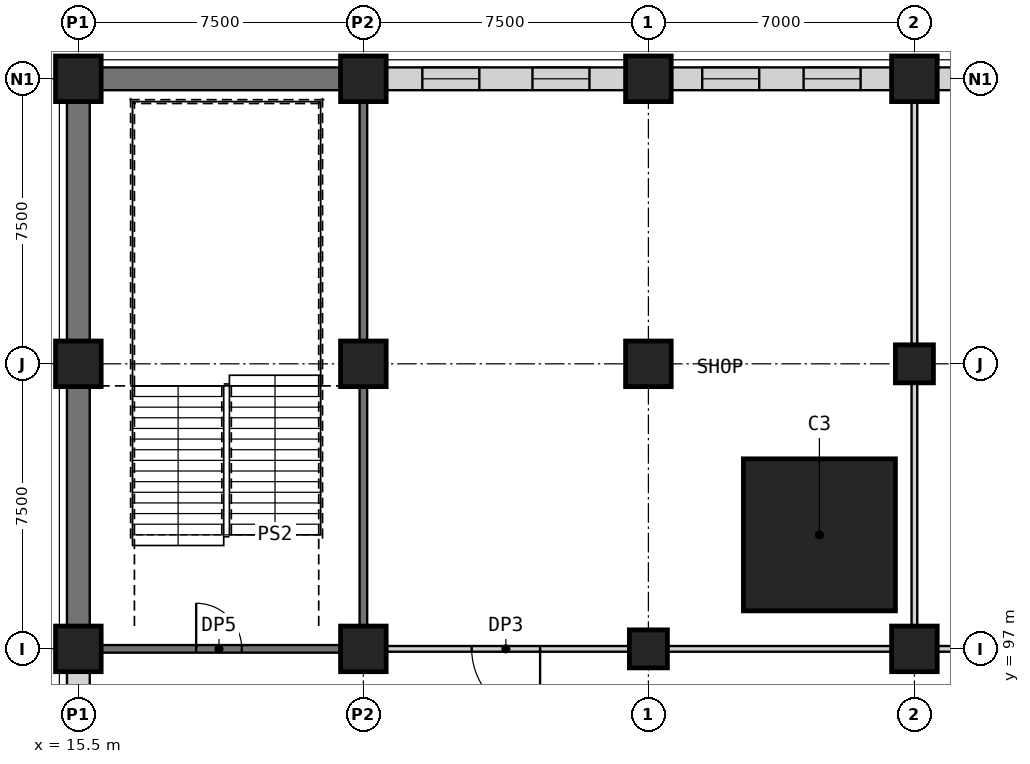
"""IFC4 building model, lengths in metres.
Left out: names, types, materials, properties, quantities, classifications, styles, units other than length and angle.
Written with IfcOpenShell. Run it as: python <this file> out.ifc"""

import sys

from ifc_helpers import new_model, si_unit, direction, frame, frame_2d, origin, origin_2d, place, context, subcontext, project, spatial, rectangle, extrude, element, fill, save


model = new_model("IFC4")
c1 = context("Model", 3, precision=1e-05, world=origin(), true_north=direction((0.0, 1.0)))
c2 = subcontext(c1, "Body", "Model", "MODEL_VIEW")
j1 = project(units=[si_unit("LENGTHUNIT", "METRE"), si_unit("PLANEANGLEUNIT", "RADIAN")], contexts=[c1])
p1 = place(None, origin())
s1 = spatial("IfcSite", under=j1, at=p1, CompositionType="ELEMENT")
p2 = place(p1, origin())
s2 = spatial("IfcBuilding", under=s1, at=p2, CompositionType="ELEMENT")
p3 = place(p2, frame((0.0, 0.0, 13.5)))
s3 = spatial("IfcBuildingStorey", under=s2, at=p3, CompositionType="ELEMENT", Elevation=13.5)
p4 = place(p3, frame((30.5, 97.0, 0.0), z_axis=(0.0, 0.0, 1.0), x_axis=(1.0, 0.0, 0.0)))
e1 = element("IfcColumn", 1, at=p4, inside=s3, PredefinedType="COLUMN", context=c2, shape_type="SweptSolid", body=[
    extrude(rectangle(XDim=1.0, YDim=1.0, at=origin_2d()), origin(), (0.0, 0.0, 1.0), 5.0),
])
p5 = place(p3, frame((37.5, 97.0, 0.0), z_axis=(0.0, 0.0, 1.0), x_axis=(1.0, 0.0, 0.0)))
e2 = element("IfcColumn", 2, at=p5, inside=s3, PredefinedType="COLUMN", context=c2, shape_type="SweptSolid", body=[
    extrude(rectangle(XDim=1.2, YDim=1.2, at=origin_2d()), origin(), (0.0, 0.0, 1.0), 5.0),
])
p6 = place(p3, frame((37.5, 104.5, 0.0), z_axis=(0.0, 0.0, 1.0), x_axis=(1.0, 0.0, 0.0)))
e3 = element("IfcColumn", 3, at=p6, inside=s3, PredefinedType="COLUMN", context=c2, shape_type="SweptSolid", body=[
    extrude(rectangle(XDim=1.0, YDim=1.0, at=origin_2d()), origin(), (0.0, 0.0, 1.0), 5.0),
])
p7 = place(p3, frame((35.0, 100.0, 0.0), z_axis=(0.0, 0.0, 1.0), x_axis=(1.0, 0.0, 0.0)))
e4 = element("IfcColumn", 4, at=p7, inside=s3, PredefinedType="COLUMN", context=c2, shape_type="SweptSolid", body=[
    extrude(rectangle(XDim=4.0, YDim=4.0, at=origin_2d()), origin(), (0.0, 0.0, 1.0), 5.0),
])
for number, where, z_axis, x_axis in (
    (5, (15.5, 97.0, 0.0), (0.0, 0.0, 1.0), (1.0, 0.0, 0.0)),
    (6, (15.5, 104.5, 0.0), (0.0, 0.0, 1.0), (1.0, 0.0, 0.0)),
    (7, (15.5, 112.0, 0.0), (0.0, 0.0, 1.0), (1.0, 0.0, 0.0)),
    (8, (23.0, 97.0, 0.0), (0.0, 0.0, 1.0), (1.0, 0.0, 0.0)),
    (9, (23.0, 104.5, 0.0), (0.0, 0.0, 1.0), (1.0, 0.0, 0.0)),
    (10, (23.0, 112.0, 0.0), (0.0, 0.0, 1.0), (1.0, 0.0, 0.0)),
    (11, (30.5, 104.5, 0.0), (0.0, 0.0, 1.0), (1.0, 0.0, 0.0)),
    (12, (30.5, 112.0, 0.0), (0.0, 0.0, 1.0), (1.0, 0.0, 0.0)),
    (13, (37.5, 112.0, 0.0), (0.0, 0.0, 1.0), (1.0, 0.0, 0.0)),
):
    element("IfcColumn", number, at=place(p3, frame(where, z_axis=z_axis, x_axis=x_axis)), inside=s3, PredefinedType="COLUMN", context=c2, shape_type="SweptSolid", body=[
        extrude(rectangle(XDim=1.2, YDim=1.2, at=origin_2d()), origin(), (0.0, 0.0, 1.0), 5.0),
    ])
p8 = place(p3, frame((16.1, 97.0, 0.0), z_axis=(0.0, 0.0, 1.0), x_axis=(1.0, 0.0, 0.0)))
e14 = element("IfcWall", 14, at=p8, inside=s3, PredefinedType="SHEAR", context=c2, shape_type="SweptSolid", body=[
    extrude(rectangle(XDim=6.3, YDim=0.2, at=frame_2d((3.15, 0.0))), origin(), (0.0, 0.0, 1.0), 4.7),
])
p9 = place(p8, frame((2.5, 0.0, 0.0)))
e15 = element("IfcOpeningElement", 15, at=p9, cuts=e14, PredefinedType="OPENING", context=c2, shape_type="SweptSolid", body=[
    extrude(rectangle(XDim=1.2, YDim=2.1, at=frame_2d((0.6, 1.05))), frame((0.0, 0.11, 0.0), z_axis=(0.0, -1.0, 0.0), x_axis=(1.0, 0.0, 0.0)), (0.0, 0.0, 1.0), 0.22),
])
p10 = place(p3, frame((30.0, 97.0, 0.0), z_axis=(0.0, 0.0, 1.0), x_axis=(-1.0, 0.0, 0.0)))
e16 = element("IfcWall", 16, at=p10, inside=s3, PredefinedType="PARTITIONING", context=c2, shape_type="SweptSolid", body=[
    extrude(rectangle(XDim=6.4, YDim=0.15, at=frame_2d((3.2, 0.0))), origin(), (0.0, 0.0, 1.0), 4.7),
])
p11 = place(p10, frame((2.35, 0.0, 0.0)))
e17 = element("IfcOpeningElement", 17, at=p11, cuts=e16, PredefinedType="OPENING", context=c2, shape_type="SweptSolid", body=[
    extrude(rectangle(XDim=1.8, YDim=2.4, at=frame_2d((0.9, 1.2))), frame((0.0, 0.085, 0.0), z_axis=(0.0, -1.0, 0.0), x_axis=(1.0, 0.0, 0.0)), (0.0, 0.0, 1.0), 0.17),
])
p12 = place(p3, frame((31.0, 97.0, 0.0), z_axis=(0.0, 0.0, 1.0), x_axis=(1.0, 0.0, 0.0)))
e18 = element("IfcWall", 18, at=p12, inside=s3, PredefinedType="PARTITIONING", context=c2, shape_type="SweptSolid", body=[
    extrude(rectangle(XDim=5.9, YDim=0.15, at=frame_2d((2.95, 0.0))), origin(), (0.0, 0.0, 1.0), 4.7),
])
p13 = place(p3, frame((44.4, 97.0, 0.0), z_axis=(0.0, 0.0, 1.0), x_axis=(-1.0, 0.0, 0.0)))
e19 = element("IfcWall", 19, at=p13, inside=s3, PredefinedType="PARTITIONING", context=c2, shape_type="SweptSolid", body=[
    extrude(rectangle(XDim=6.3, YDim=0.15, at=frame_2d((3.15, 0.0))), origin(), (0.0, 0.0, 1.0), 4.7),
])
p14 = place(p13, frame((2.25, 0.0, 0.0)))
e20 = element("IfcOpeningElement", 20, at=p14, cuts=e19, PredefinedType="OPENING", context=c2, shape_type="SweptSolid", body=[
    extrude(rectangle(XDim=1.8, YDim=2.4, at=frame_2d((0.9, 1.2))), frame((0.0, 0.085, 0.0), z_axis=(0.0, -1.0, 0.0), x_axis=(1.0, 0.0, 0.0)), (0.0, 0.0, 1.0), 0.17),
])
p15 = place(p3, frame((16.1, 112.0, 0.0), z_axis=(0.0, 0.0, 1.0), x_axis=(1.0, 0.0, 0.0)))
e21 = element("IfcWall", 21, at=p15, inside=s3, PredefinedType="PARTITIONING", context=c2, shape_type="SweptSolid", body=[
    extrude(rectangle(XDim=6.3, YDim=0.6, at=frame_2d((3.15, 0.0))), origin(), (0.0, 0.0, 1.0), 4.1),
])
p16 = place(p3, frame((23.6, 112.0, 0.0), z_axis=(0.0, 0.0, 1.0), x_axis=(1.0, 0.0, 0.0)))
e22 = element("IfcWall", 22, at=p16, inside=s3, PredefinedType="PARTITIONING", context=c2, shape_type="SweptSolid", body=[
    extrude(rectangle(XDim=6.3, YDim=0.6, at=frame_2d((3.15, 0.0))), origin(), (0.0, 0.0, 1.0), 4.1),
])
p17 = place(p16, frame((0.951, 0.0, 0.9)))
e23 = element("IfcOpeningElement", 23, at=p17, cuts=e22, PredefinedType="OPENING", context=c2, shape_type="SweptSolid", body=[
    extrude(rectangle(XDim=1.5, YDim=2.8, at=frame_2d((0.75, 1.4))), frame((0.0, 0.31, 0.0), z_axis=(0.0, -1.0, 0.0), x_axis=(1.0, 0.0, 0.0)), (0.0, 0.0, 1.0), 0.62),
])
p18 = place(p16, frame((3.849, 0.0, 0.9)))
e24 = element("IfcOpeningElement", 24, at=p18, cuts=e22, PredefinedType="OPENING", context=c2, shape_type="SweptSolid", body=[
    extrude(rectangle(XDim=1.5, YDim=2.8, at=frame_2d((0.75, 1.4))), frame((0.0, 0.31, 0.0), z_axis=(0.0, -1.0, 0.0), x_axis=(1.0, 0.0, 0.0)), (0.0, 0.0, 1.0), 0.62),
])
p19 = place(p3, frame((31.1, 112.0, 0.0), z_axis=(0.0, 0.0, 1.0), x_axis=(1.0, 0.0, 0.0)))
e25 = element("IfcWall", 25, at=p19, inside=s3, PredefinedType="PARTITIONING", context=c2, shape_type="SweptSolid", body=[
    extrude(rectangle(XDim=5.8, YDim=0.6, at=frame_2d((2.9, 0.0))), origin(), (0.0, 0.0, 1.0), 4.1),
])
p20 = place(p19, frame((0.816, 0.0, 0.9)))
e26 = element("IfcOpeningElement", 26, at=p20, cuts=e25, PredefinedType="OPENING", context=c2, shape_type="SweptSolid", body=[
    extrude(rectangle(XDim=1.5, YDim=2.8, at=frame_2d((0.75, 1.4))), frame((0.0, 0.31, 0.0), z_axis=(0.0, -1.0, 0.0), x_axis=(1.0, 0.0, 0.0)), (0.0, 0.0, 1.0), 0.62),
])
p21 = place(p19, frame((3.484, 0.0, 0.9)))
e27 = element("IfcOpeningElement", 27, at=p21, cuts=e25, PredefinedType="OPENING", context=c2, shape_type="SweptSolid", body=[
    extrude(rectangle(XDim=1.5, YDim=2.8, at=frame_2d((0.75, 1.4))), frame((0.0, 0.31, 0.0), z_axis=(0.0, -1.0, 0.0), x_axis=(1.0, 0.0, 0.0)), (0.0, 0.0, 1.0), 0.62),
])
p22 = place(p3, frame((38.1, 112.0, 0.0), z_axis=(0.0, 0.0, 1.0), x_axis=(1.0, 0.0, 0.0)))
e28 = element("IfcWall", 28, at=p22, inside=s3, PredefinedType="PARTITIONING", context=c2, shape_type="SweptSolid", body=[
    extrude(rectangle(XDim=6.3, YDim=0.6, at=frame_2d((3.15, 0.0))), origin(), (0.0, 0.0, 1.0), 4.1),
])
p23 = place(p22, frame((0.951, 0.0, 0.9)))
e29 = element("IfcOpeningElement", 29, at=p23, cuts=e28, PredefinedType="OPENING", context=c2, shape_type="SweptSolid", body=[
    extrude(rectangle(XDim=1.5, YDim=2.8, at=frame_2d((0.75, 1.4))), frame((0.0, 0.31, 0.0), z_axis=(0.0, -1.0, 0.0), x_axis=(1.0, 0.0, 0.0)), (0.0, 0.0, 1.0), 0.62),
])
p24 = place(p22, frame((3.849, 0.0, 0.9)))
e30 = element("IfcOpeningElement", 30, at=p24, cuts=e28, PredefinedType="OPENING", context=c2, shape_type="SweptSolid", body=[
    extrude(rectangle(XDim=1.5, YDim=2.8, at=frame_2d((0.75, 1.4))), frame((0.0, 0.31, 0.0), z_axis=(0.0, -1.0, 0.0), x_axis=(1.0, 0.0, 0.0)), (0.0, 0.0, 1.0), 0.62),
])
p25 = place(p3, frame((15.5, 90.6, 0.0), z_axis=(0.0, 0.0, 1.0), x_axis=(0.0, 1.0, 0.0)))
e31 = element("IfcWall", 31, at=p25, inside=s3, PredefinedType="PARTITIONING", context=c2, shape_type="SweptSolid", body=[
    extrude(rectangle(XDim=5.8, YDim=0.6, at=frame_2d((2.9, 0.0))), origin(), (0.0, 0.0, 1.0), 4.1),
])
p26 = place(p25, frame((0.816, 0.0, 0.9)))
e32 = element("IfcOpeningElement", 32, at=p26, cuts=e31, PredefinedType="OPENING", context=c2, shape_type="SweptSolid", body=[
    extrude(rectangle(XDim=1.5, YDim=2.8, at=frame_2d((0.75, 1.4))), frame((0.0, 0.31, 0.0), z_axis=(0.0, -1.0, 0.0), x_axis=(1.0, 0.0, 0.0)), (0.0, 0.0, 1.0), 0.62),
])
p27 = place(p25, frame((3.484, 0.0, 0.9)))
e33 = element("IfcOpeningElement", 33, at=p27, cuts=e31, PredefinedType="OPENING", context=c2, shape_type="SweptSolid", body=[
    extrude(rectangle(XDim=1.5, YDim=2.8, at=frame_2d((0.75, 1.4))), frame((0.0, 0.31, 0.0), z_axis=(0.0, -1.0, 0.0), x_axis=(1.0, 0.0, 0.0)), (0.0, 0.0, 1.0), 0.62),
])
for number, where, z_axis, x_axis in (
    (34, (15.5, 97.6, 0.0), (0.0, 0.0, 1.0), (0.0, 1.0, 0.0)),
    (35, (15.5, 105.1, 0.0), (0.0, 0.0, 1.0), (0.0, 1.0, 0.0)),
):
    element("IfcWall", number, at=place(p3, frame(where, z_axis=z_axis, x_axis=x_axis)), inside=s3, PredefinedType="PARTITIONING", context=c2, shape_type="SweptSolid", body=[
        extrude(rectangle(XDim=6.3, YDim=0.6, at=frame_2d((3.15, 0.0))), origin(), (0.0, 0.0, 1.0), 4.1),
    ])
for number, where, z_axis, x_axis in (
    (36, (23.0, 97.6, 0.0), (0.0, 0.0, 1.0), (0.0, 1.0, 0.0)),
    (37, (23.0, 105.1, 0.0), (0.0, 0.0, 1.0), (0.0, 1.0, 0.0)),
):
    element("IfcWall", number, at=place(p3, frame(where, z_axis=z_axis, x_axis=x_axis)), inside=s3, PredefinedType="SHEAR", context=c2, shape_type="SweptSolid", body=[
        extrude(rectangle(XDim=6.3, YDim=0.2, at=frame_2d((3.15, 0.0))), origin(), (0.0, 0.0, 1.0), 4.7),
    ])
for number, where, z_axis, x_axis in (
    (38, (37.5, 97.6, 0.0), (0.0, 0.0, 1.0), (0.0, 1.0, 0.0)),
    (39, (37.5, 105.0, 0.0), (0.0, 0.0, 1.0), (0.0, 1.0, 0.0)),
):
    element("IfcWall", number, at=place(p3, frame(where, z_axis=z_axis, x_axis=x_axis)), inside=s3, PredefinedType="PARTITIONING", context=c2, shape_type="SweptSolid", body=[
        extrude(rectangle(XDim=6.4, YDim=0.15, at=frame_2d((3.2, 0.0))), origin(), (0.0, 0.0, 1.0), 4.7),
    ])
p28 = place(p9, origin())
e40 = element("IfcDoor", 40, at=p28, inside=s3, OperationType="SINGLE_SWING_LEFT", PredefinedType="DOOR", context=c2, shape_type="SweptSolid", body=[
    extrude(rectangle(XDim=1.2, YDim=2.1, at=frame_2d((0.6, 1.05))), frame((0.0, 0.025, 0.0), z_axis=(0.0, -1.0, 0.0), x_axis=(1.0, 0.0, 0.0)), (0.0, 0.0, 1.0), 0.05),
])
fill(e15, e40)
p29 = place(p11, origin())
e41 = element("IfcDoor", 41, at=p29, inside=s3, OperationType="SINGLE_SWING_LEFT", PredefinedType="DOOR", context=c2, shape_type="SweptSolid", body=[
    extrude(rectangle(XDim=1.8, YDim=2.4, at=frame_2d((0.9, 1.2))), frame((0.0, 0.025, 0.0), z_axis=(0.0, -1.0, 0.0), x_axis=(1.0, 0.0, 0.0)), (0.0, 0.0, 1.0), 0.05),
])
fill(e17, e41)
p30 = place(p17, origin())
e42 = element("IfcWindow", 42, at=p30, inside=s3, PartitioningType="SINGLE_PANEL", PredefinedType="WINDOW", context=c2, shape_type="SweptSolid", body=[
    extrude(rectangle(XDim=1.5, YDim=2.8, at=frame_2d((0.75, 1.4))), frame((0.0, 0.03, 0.0), z_axis=(0.0, -1.0, 0.0), x_axis=(1.0, 0.0, 0.0)), (0.0, 0.0, 1.0), 0.06),
])
fill(e23, e42)
p31 = place(p18, origin())
e43 = element("IfcWindow", 43, at=p31, inside=s3, PartitioningType="SINGLE_PANEL", PredefinedType="WINDOW", context=c2, shape_type="SweptSolid", body=[
    extrude(rectangle(XDim=1.5, YDim=2.8, at=frame_2d((0.75, 1.4))), frame((0.0, 0.03, 0.0), z_axis=(0.0, -1.0, 0.0), x_axis=(1.0, 0.0, 0.0)), (0.0, 0.0, 1.0), 0.06),
])
fill(e24, e43)
p32 = place(p20, origin())
e44 = element("IfcWindow", 44, at=p32, inside=s3, PartitioningType="SINGLE_PANEL", PredefinedType="WINDOW", context=c2, shape_type="SweptSolid", body=[
    extrude(rectangle(XDim=1.5, YDim=2.8, at=frame_2d((0.75, 1.4))), frame((0.0, 0.03, 0.0), z_axis=(0.0, -1.0, 0.0), x_axis=(1.0, 0.0, 0.0)), (0.0, 0.0, 1.0), 0.06),
])
fill(e26, e44)
p33 = place(p21, origin())
e45 = element("IfcWindow", 45, at=p33, inside=s3, PartitioningType="SINGLE_PANEL", PredefinedType="WINDOW", context=c2, shape_type="SweptSolid", body=[
    extrude(rectangle(XDim=1.5, YDim=2.8, at=frame_2d((0.75, 1.4))), frame((0.0, 0.03, 0.0), z_axis=(0.0, -1.0, 0.0), x_axis=(1.0, 0.0, 0.0)), (0.0, 0.0, 1.0), 0.06),
])
fill(e27, e45)
save(model, sys.argv[1])
